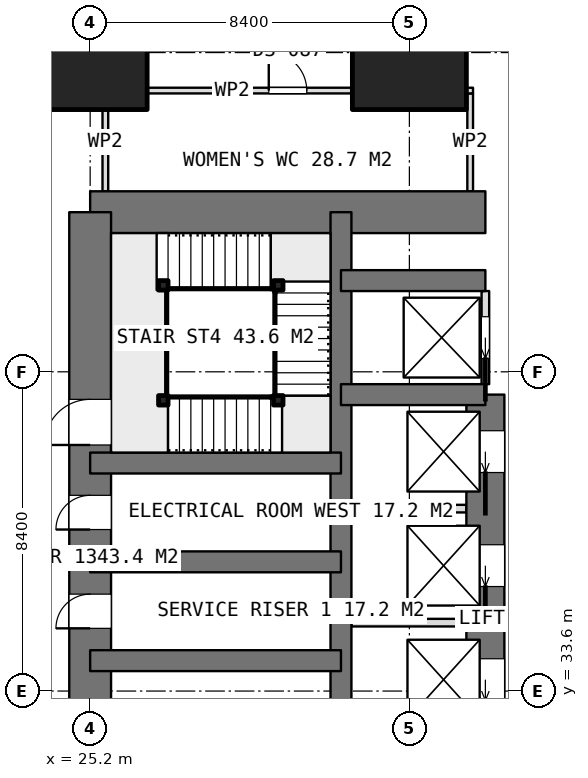
"""IFC4 building model, lengths in metres.
Left out: names, types, materials, properties, quantities, classifications, styles, units other than length and angle.
Written with IfcOpenShell. Run it as: python <this file> out.ifc"""

import sys

from ifc_helpers import new_model, si_unit, direction, frame, frame_2d, origin, origin_2d, place, context, subcontext, project, spatial, rectangle, extrude, element, fill, save


model = new_model("IFC4")
c1 = context("Model", 3, precision=1e-05, world=origin(), true_north=direction((0.0, 1.0)))
c2 = subcontext(c1, "Body", "Model", "MODEL_VIEW")
j1 = project(units=[si_unit("LENGTHUNIT", "METRE"), si_unit("PLANEANGLEUNIT", "RADIAN")], contexts=[c1])
p1 = place(None, origin())
s1 = spatial("IfcSite", under=j1, at=p1, CompositionType="ELEMENT")
p2 = place(p1, origin())
s2 = spatial("IfcBuilding", under=s1, at=p2, CompositionType="ELEMENT")
p3 = place(p2, frame((0.0, 0.0, 77.9)))
s3 = spatial("IfcBuildingStorey", under=s2, at=p3, CompositionType="ELEMENT", Elevation=77.9)
p4 = place(p3, frame((25.2, 46.2, 0.0), z_axis=(0.0, 0.0, 1.0), x_axis=(1.0, 0.0, 0.0)))
e1 = element("IfcWall", 1, at=p4, inside=s3, PredefinedType="SHEAR", context=c2, shape_type="SweptSolid", body=[
    extrude(rectangle(XDim=10.4, YDim=1.1, at=frame_2d((5.2, 0.0))), origin(), (0.0, 0.0, 1.0), 3.75),
])
p5 = place(p3, frame((25.2, 21.0, 0.0), z_axis=(0.0, 0.0, 1.0), x_axis=(0.0, 1.0, 0.0)))
e2 = element("IfcWall", 2, at=p5, inside=s3, PredefinedType="SHEAR", context=c2, shape_type="SweptSolid", body=[
    extrude(rectangle(XDim=25.2, YDim=1.1, at=frame_2d((12.6, 0.0))), origin(), (0.0, 0.0, 1.0), 3.75),
])
p6 = place(p5, frame((7.8, 0.0, 0.0)))
e3 = element("IfcOpeningElement", 3, at=p6, cuts=e2, PredefinedType="OPENING", context=c2, shape_type="SweptSolid", body=[
    extrude(rectangle(XDim=1.2, YDim=2.1, at=frame_2d((0.6, 1.05))), frame((0.0, 0.56, 0.0), z_axis=(0.0, -1.0, 0.0), x_axis=(1.0, 0.0, 0.0)), (0.0, 0.0, 1.0), 1.12),
])
p7 = place(p5, frame((14.25, 0.0, 0.0)))
e4 = element("IfcOpeningElement", 4, at=p7, cuts=e2, PredefinedType="OPENING", context=c2, shape_type="SweptSolid", body=[
    extrude(rectangle(XDim=0.9, YDim=2.1, at=frame_2d((0.45, 1.05))), frame((0.0, 0.56, 0.0), z_axis=(0.0, -1.0, 0.0), x_axis=(1.0, 0.0, 0.0)), (0.0, 0.0, 1.0), 1.12),
])
p8 = place(p5, frame((16.85, 0.0, 0.0)))
e5 = element("IfcOpeningElement", 5, at=p8, cuts=e2, PredefinedType="OPENING", context=c2, shape_type="SweptSolid", body=[
    extrude(rectangle(XDim=0.9, YDim=2.1, at=frame_2d((0.45, 1.05))), frame((0.0, 0.56, 0.0), z_axis=(0.0, -1.0, 0.0), x_axis=(1.0, 0.0, 0.0)), (0.0, 0.0, 1.0), 1.12),
])
p9 = place(p5, frame((19.075, 0.0, 0.0)))
e6 = element("IfcOpeningElement", 6, at=p9, cuts=e2, PredefinedType="OPENING", context=c2, shape_type="SweptSolid", body=[
    extrude(rectangle(XDim=1.2, YDim=2.1, at=frame_2d((0.6, 1.05))), frame((0.0, 0.56, 0.0), z_axis=(0.0, -1.0, 0.0), x_axis=(1.0, 0.0, 0.0)), (0.0, 0.0, 1.0), 1.12),
])
p10 = place(p3, frame((31.8, 21.0, 0.0), z_axis=(0.0, 0.0, 1.0), x_axis=(0.0, 1.0, 0.0)))
e7 = element("IfcWall", 7, at=p10, inside=s3, PredefinedType="SHEAR", context=c2, shape_type="SweptSolid", body=[
    extrude(rectangle(XDim=25.2, YDim=0.55, at=frame_2d((12.6, 0.0))), origin(), (0.0, 0.0, 1.0), 3.75),
])
p11 = place(p3, frame((35.6, 23.4, 0.0), z_axis=(0.0, 0.0, 1.0), x_axis=(0.0, 1.0, 0.0)))
e8 = element("IfcWall", 8, at=p11, inside=s3, PredefinedType="SHEAR", context=c2, shape_type="SweptSolid", body=[
    extrude(rectangle(XDim=18.0, YDim=1.0, at=frame_2d((9.0, 0.0))), origin(), (0.0, 0.0, 1.0), 3.75),
])
p12 = place(p11, frame((0.95, 0.0, 0.0)))
e9 = element("IfcOpeningElement", 9, at=p12, cuts=e8, PredefinedType="OPENING", context=c2, shape_type="SweptSolid", body=[
    extrude(rectangle(XDim=1.1, YDim=2.1, at=frame_2d((0.55, 1.05))), frame((0.0, 0.51, 0.0), z_axis=(0.0, -1.0, 0.0), x_axis=(1.0, 0.0, 0.0)), (0.0, 0.0, 1.0), 1.02),
])
p13 = place(p11, frame((3.95, 0.0, 0.0)))
e10 = element("IfcOpeningElement", 10, at=p13, cuts=e8, PredefinedType="OPENING", context=c2, shape_type="SweptSolid", body=[
    extrude(rectangle(XDim=1.1, YDim=2.1, at=frame_2d((0.55, 1.05))), frame((0.0, 0.51, 0.0), z_axis=(0.0, -1.0, 0.0), x_axis=(1.0, 0.0, 0.0)), (0.0, 0.0, 1.0), 1.02),
])
p14 = place(p11, frame((6.95, 0.0, 0.0)))
e11 = element("IfcOpeningElement", 11, at=p14, cuts=e8, PredefinedType="OPENING", context=c2, shape_type="SweptSolid", body=[
    extrude(rectangle(XDim=1.1, YDim=2.1, at=frame_2d((0.55, 1.05))), frame((0.0, 0.51, 0.0), z_axis=(0.0, -1.0, 0.0), x_axis=(1.0, 0.0, 0.0)), (0.0, 0.0, 1.0), 1.02),
])
p15 = place(p11, frame((9.95, 0.0, 0.0)))
e12 = element("IfcOpeningElement", 12, at=p15, cuts=e8, PredefinedType="OPENING", context=c2, shape_type="SweptSolid", body=[
    extrude(rectangle(XDim=1.1, YDim=2.1, at=frame_2d((0.55, 1.05))), frame((0.0, 0.51, 0.0), z_axis=(0.0, -1.0, 0.0), x_axis=(1.0, 0.0, 0.0)), (0.0, 0.0, 1.0), 1.02),
])
p16 = place(p11, frame((12.95, 0.0, 0.0)))
e13 = element("IfcOpeningElement", 13, at=p16, cuts=e8, PredefinedType="OPENING", context=c2, shape_type="SweptSolid", body=[
    extrude(rectangle(XDim=1.1, YDim=2.1, at=frame_2d((0.55, 1.05))), frame((0.0, 0.51, 0.0), z_axis=(0.0, -1.0, 0.0), x_axis=(1.0, 0.0, 0.0)), (0.0, 0.0, 1.0), 1.02),
])
p17 = place(p11, frame((15.95, 0.0, 0.0)))
e14 = element("IfcOpeningElement", 14, at=p17, cuts=e8, PredefinedType="OPENING", context=c2, shape_type="SweptSolid", body=[
    extrude(rectangle(XDim=1.1, YDim=2.1, at=frame_2d((0.55, 1.05))), frame((0.0, 0.51, 0.0), z_axis=(0.0, -1.0, 0.0), x_axis=(1.0, 0.0, 0.0)), (0.0, 0.0, 1.0), 1.02),
])
for number, where, z_axis, x_axis in (
    (15, (31.8, 41.4, 0.0), (0.0, 0.0, 1.0), (1.0, 0.0, 0.0)),
    (16, (31.8, 44.4, 0.0), (0.0, 0.0, 1.0), (1.0, 0.0, 0.0)),
):
    element("IfcWall", number, at=place(p3, frame(where, z_axis=z_axis, x_axis=x_axis)), inside=s3, PredefinedType="SHEAR", context=c2, shape_type="SweptSolid", body=[
        extrude(rectangle(XDim=3.8, YDim=0.55, at=frame_2d((1.9, 0.0))), origin(), (0.0, 0.0, 1.0), 3.75),
    ])
for number, where, z_axis, x_axis in (
    (17, (25.2, 34.4, 0.0), (0.0, 0.0, 1.0), (1.0, 0.0, 0.0)),
    (18, (25.2, 37.0, 0.0), (0.0, 0.0, 1.0), (1.0, 0.0, 0.0)),
    (19, (25.2, 39.6, 0.0), (0.0, 0.0, 1.0), (1.0, 0.0, 0.0)),
):
    element("IfcWall", number, at=place(p3, frame(where, z_axis=z_axis, x_axis=x_axis)), inside=s3, PredefinedType="SHEAR", context=c2, shape_type="SweptSolid", body=[
        extrude(rectangle(XDim=6.6, YDim=0.55, at=frame_2d((3.3, 0.0))), origin(), (0.0, 0.0, 1.0), 3.75),
    ])
for number, where, z_axis, x_axis in (
    (20, (25.2, 50.4, 0.0), (0.0, 0.0, 1.0), (1.0, 0.0, 0.0)),
    (21, (33.6, 50.4, 0.0), (0.0, 0.0, 1.0), (1.0, 0.0, 0.0)),
):
    element("IfcColumn", number, at=place(p3, frame(where, z_axis=z_axis, x_axis=x_axis)), inside=s3, PredefinedType="COLUMN", context=c2, shape_type="SweptSolid", body=[
        extrude(rectangle(XDim=3.0, YDim=3.0, at=origin_2d()), origin(), (0.0, 0.0, 1.0), 3.75),
    ])
for number, where, z_axis, x_axis in (
    (22, (32.075, 35.4, 0.0), (0.0, 0.0, 1.0), (1.0, 0.0, 0.0)),
    (23, (32.075, 38.4, 0.0), (0.0, 0.0, 1.0), (1.0, 0.0, 0.0)),
):
    element("IfcWall", number, at=place(p3, frame(where, z_axis=z_axis, x_axis=x_axis)), inside=s3, PredefinedType="PARTITIONING", context=c2, shape_type="SweptSolid", body=[
        extrude(rectangle(XDim=3.025, YDim=0.2, at=frame_2d((1.513, 0.0))), origin(), (0.0, 0.0, 1.0), 3.5),
    ])
p18 = place(p3, frame((35.6, 41.675, 0.0), z_axis=(0.0, 0.0, 1.0), x_axis=(0.0, 1.0, 0.0)))
e24 = element("IfcWall", 24, at=p18, inside=s3, PredefinedType="PARTITIONING", context=c2, shape_type="SweptSolid", body=[
    extrude(rectangle(XDim=2.45, YDim=0.2, at=frame_2d((1.225, 0.0))), origin(), (0.0, 0.0, 1.0), 3.5),
])
p19 = place(p18, frame((0.675, 0.0, 0.0)))
e25 = element("IfcOpeningElement", 25, at=p19, cuts=e24, PredefinedType="OPENING", context=c2, shape_type="SweptSolid", body=[
    extrude(rectangle(XDim=1.1, YDim=2.1, at=frame_2d((0.55, 1.05))), frame((0.0, 0.11, 0.0), z_axis=(0.0, -1.0, 0.0), x_axis=(1.0, 0.0, 0.0)), (0.0, 0.0, 1.0), 0.22),
])
p20 = place(p3, frame((25.525, 49.4, 0.0), z_axis=(0.0, 0.0, 1.0), x_axis=(1.0, 0.0, 0.0)))
e26 = element("IfcWall", 26, at=p20, inside=s3, PredefinedType="PARTITIONING", context=c2, shape_type="SweptSolid", body=[
    extrude(rectangle(XDim=9.75, YDim=0.15, at=frame_2d((4.875, 0.0))), origin(), (0.0, 0.0, 1.0), 3.5),
])
p21 = place(p20, frame((4.375, 0.0, 0.0)))
e27 = element("IfcOpeningElement", 27, at=p21, cuts=e26, PredefinedType="OPENING", context=c2, shape_type="SweptSolid", body=[
    extrude(rectangle(XDim=1.0, YDim=2.1, at=frame_2d((0.5, 1.05))), frame((0.0, 0.085, 0.0), z_axis=(0.0, -1.0, 0.0), x_axis=(1.0, 0.0, 0.0)), (0.0, 0.0, 1.0), 0.17),
])
for number, where, z_axis, x_axis in (
    (28, (25.6, 46.75, 0.0), (0.0, 0.0, 1.0), (0.0, 1.0, 0.0)),
    (29, (35.2, 46.75, 0.0), (0.0, 0.0, 1.0), (0.0, 1.0, 0.0)),
):
    element("IfcWall", number, at=place(p3, frame(where, z_axis=z_axis, x_axis=x_axis)), inside=s3, PredefinedType="PARTITIONING", context=c2, shape_type="SweptSolid", body=[
        extrude(rectangle(XDim=2.575, YDim=0.15, at=frame_2d((1.288, 0.0))), origin(), (0.0, 0.0, 1.0), 3.5),
    ])
for number, where, z_axis, x_axis in (
    (30, (27.125, 41.25, 0.0), (0.0, 0.0, 1.0), (1.0, 0.0, 0.0)),
    (31, (30.15, 41.25, 0.0), (0.0, 0.0, 1.0), (1.0, 0.0, 0.0)),
    (32, (30.15, 44.275, 0.0), (0.0, 0.0, 1.0), (1.0, 0.0, 0.0)),
    (33, (27.125, 44.275, 0.0), (0.0, 0.0, 1.0), (1.0, 0.0, 0.0)),
):
    element("IfcColumn", number, at=place(p3, frame(where, z_axis=z_axis, x_axis=x_axis)), inside=s3, PredefinedType="COLUMN", context=c2, shape_type="SweptSolid", body=[
        extrude(rectangle(XDim=0.25, YDim=0.25, at=origin_2d()), origin(), (0.0, 0.0, 1.0), 3.75),
    ])
p22 = place(p7, origin())
e34 = element("IfcDoor", 34, at=p22, inside=s3, OperationType="SINGLE_SWING_LEFT", PredefinedType="DOOR", context=c2, shape_type="SweptSolid", body=[
    extrude(rectangle(XDim=0.9, YDim=2.1, at=frame_2d((0.45, 1.05))), frame((0.0, 0.025, 0.0), z_axis=(0.0, -1.0, 0.0), x_axis=(1.0, 0.0, 0.0)), (0.0, 0.0, 1.0), 0.05),
])
fill(e4, e34)
p23 = place(p8, origin())
e35 = element("IfcDoor", 35, at=p23, inside=s3, OperationType="SINGLE_SWING_LEFT", PredefinedType="DOOR", context=c2, shape_type="SweptSolid", body=[
    extrude(rectangle(XDim=0.9, YDim=2.1, at=frame_2d((0.45, 1.05))), frame((0.0, 0.025, 0.0), z_axis=(0.0, -1.0, 0.0), x_axis=(1.0, 0.0, 0.0)), (0.0, 0.0, 1.0), 0.05),
])
fill(e5, e35)
p24 = place(p15, origin())
e36 = element("IfcDoor", 36, at=p24, inside=s3, OperationType="SLIDING_TO_LEFT", PredefinedType="USERDEFINED", context=c2, shape_type="SweptSolid", body=[
    extrude(rectangle(XDim=1.1, YDim=2.1, at=frame_2d((0.55, 1.05))), frame((0.0, 0.025, 0.0), z_axis=(0.0, -1.0, 0.0), x_axis=(1.0, 0.0, 0.0)), (0.0, 0.0, 1.0), 0.05),
])
fill(e12, e36)
p25 = place(p16, origin())
e37 = element("IfcDoor", 37, at=p25, inside=s3, OperationType="SLIDING_TO_LEFT", PredefinedType="USERDEFINED", context=c2, shape_type="SweptSolid", body=[
    extrude(rectangle(XDim=1.1, YDim=2.1, at=frame_2d((0.55, 1.05))), frame((0.0, 0.025, 0.0), z_axis=(0.0, -1.0, 0.0), x_axis=(1.0, 0.0, 0.0)), (0.0, 0.0, 1.0), 0.05),
])
fill(e13, e37)
p26 = place(p17, origin())
e38 = element("IfcDoor", 38, at=p26, inside=s3, OperationType="SLIDING_TO_LEFT", PredefinedType="USERDEFINED", context=c2, shape_type="SweptSolid", body=[
    extrude(rectangle(XDim=1.1, YDim=2.1, at=frame_2d((0.55, 1.05))), frame((0.0, 0.025, 0.0), z_axis=(0.0, -1.0, 0.0), x_axis=(1.0, 0.0, 0.0)), (0.0, 0.0, 1.0), 0.05),
])
fill(e14, e38)
p27 = place(p19, origin())
e39 = element("IfcDoor", 39, at=p27, inside=s3, OperationType="SLIDING_TO_LEFT", PredefinedType="USERDEFINED", context=c2, shape_type="SweptSolid", body=[
    extrude(rectangle(XDim=1.1, YDim=2.1, at=frame_2d((0.55, 1.05))), frame((0.0, 0.025, 0.0), z_axis=(0.0, -1.0, 0.0), x_axis=(1.0, 0.0, 0.0)), (0.0, 0.0, 1.0), 0.05),
])
fill(e25, e39)
p28 = place(p21, origin())
e40 = element("IfcDoor", 40, at=p28, inside=s3, OperationType="SINGLE_SWING_LEFT", PredefinedType="DOOR", context=c2, shape_type="SweptSolid", body=[
    extrude(rectangle(XDim=1.0, YDim=2.1, at=frame_2d((0.5, 1.05))), frame((0.0, 0.025, 0.0), z_axis=(0.0, -1.0, 0.0), x_axis=(1.0, 0.0, 0.0)), (0.0, 0.0, 1.0), 0.05),
])
fill(e27, e40)
p29 = place(p9, origin())
e41 = element("IfcDoor", 41, at=p29, inside=s3, OperationType="SINGLE_SWING_RIGHT", PredefinedType="DOOR", context=c2, shape_type="SweptSolid", body=[
    extrude(rectangle(XDim=1.2, YDim=2.1, at=frame_2d((0.6, 1.05))), frame((0.0, 0.025, 0.0), z_axis=(0.0, -1.0, 0.0), x_axis=(1.0, 0.0, 0.0)), (0.0, 0.0, 1.0), 0.05),
])
fill(e6, e41)
save(model, sys.argv[1])
